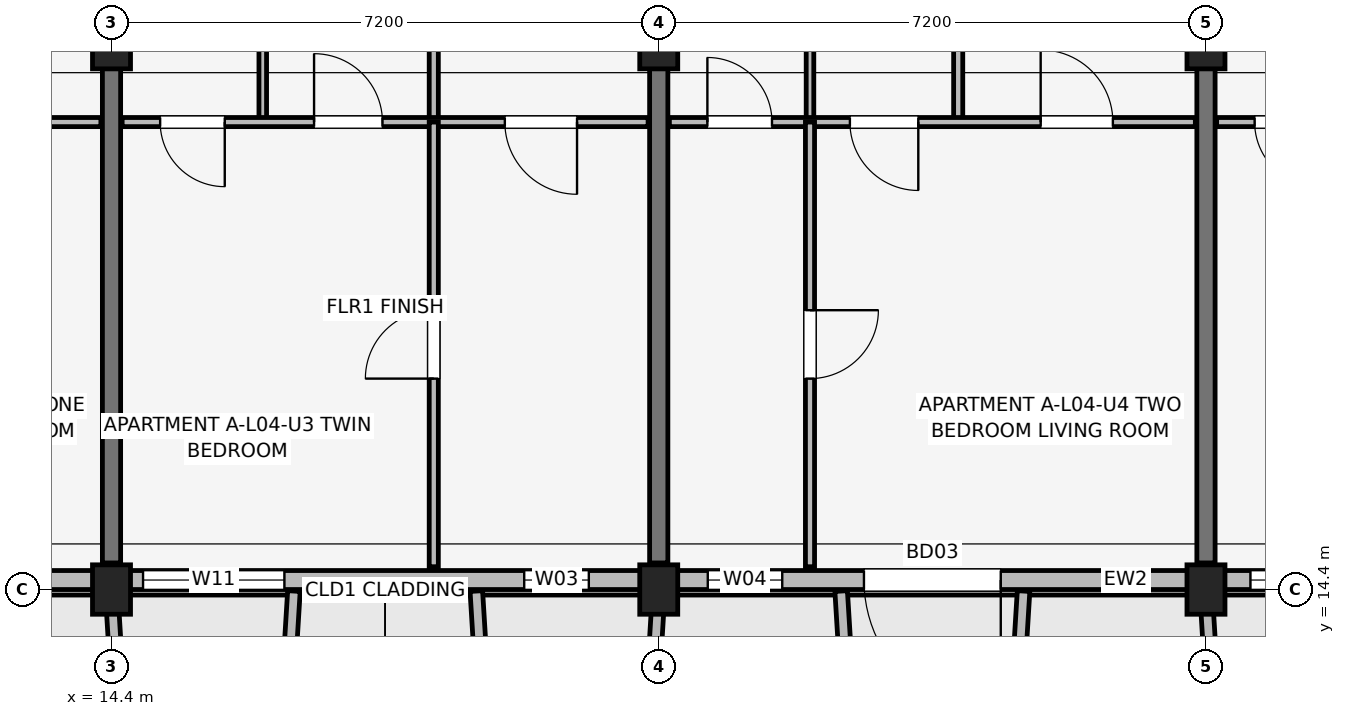
"""IFC4 building model, lengths in metres.
Left out: names, types, materials, properties, quantities, classifications, styles, units other than length and angle.
Written with IfcOpenShell. Run it as: python <this file> out.ifc"""

import sys

from ifc_helpers import new_model, si_unit, direction, frame, frame_2d, origin, origin_2d, place, context, subcontext, project, spatial, rectangle, extrude, element, fill, save


model = new_model("IFC4")
c1 = context("Model", 3, precision=1e-05, world=origin(), true_north=direction((0.0, 1.0)))
c2 = subcontext(c1, "Body", "Model", "MODEL_VIEW")
j1 = project(units=[si_unit("LENGTHUNIT", "METRE"), si_unit("PLANEANGLEUNIT", "RADIAN")], contexts=[c1])
p1 = place(None, origin())
s1 = spatial("IfcSite", under=j1, at=p1, CompositionType="ELEMENT")
p2 = place(p1, origin())
s2 = spatial("IfcBuilding", under=s1, at=p2, CompositionType="ELEMENT")
p3 = place(p2, frame((0.0, 0.0, 15.0)))
s3 = spatial("IfcBuildingStorey", under=s2, at=p3, CompositionType="ELEMENT", Elevation=15.0)
p4 = place(p3, frame((14.4, 14.4, 0.0), z_axis=(0.0, 0.0, 1.0), x_axis=(1.0, 0.0, 0.0)))
e1 = element("IfcColumn", 1, at=p4, inside=s3, PredefinedType="COLUMN", context=c2, shape_type="SweptSolid", body=[
    extrude(rectangle(XDim=0.5, YDim=0.65, at=origin_2d()), origin(), (0.0, 0.0, 1.0), 3.15),
])
p5 = place(p3, frame((14.4, 21.6, 0.0), z_axis=(0.0, 0.0, 1.0), x_axis=(1.0, 0.0, 0.0)))
e2 = element("IfcColumn", 2, at=p5, inside=s3, PredefinedType="COLUMN", context=c2, shape_type="SweptSolid", body=[
    extrude(rectangle(XDim=0.5, YDim=0.7, at=origin_2d()), origin(), (0.0, 0.0, 1.0), 3.15),
])
p6 = place(p3, frame((21.6, 14.4, 0.0), z_axis=(0.0, 0.0, 1.0), x_axis=(1.0, 0.0, 0.0)))
e3 = element("IfcColumn", 3, at=p6, inside=s3, PredefinedType="COLUMN", context=c2, shape_type="SweptSolid", body=[
    extrude(rectangle(XDim=0.5, YDim=0.65, at=origin_2d()), origin(), (0.0, 0.0, 1.0), 3.15),
])
p7 = place(p3, frame((21.6, 21.6, 0.0), z_axis=(0.0, 0.0, 1.0), x_axis=(1.0, 0.0, 0.0)))
e4 = element("IfcColumn", 4, at=p7, inside=s3, PredefinedType="COLUMN", context=c2, shape_type="SweptSolid", body=[
    extrude(rectangle(XDim=0.5, YDim=0.7, at=origin_2d()), origin(), (0.0, 0.0, 1.0), 3.15),
])
p8 = place(p3, frame((28.8, 14.4, 0.0), z_axis=(0.0, 0.0, 1.0), x_axis=(1.0, 0.0, 0.0)))
e5 = element("IfcColumn", 5, at=p8, inside=s3, PredefinedType="COLUMN", context=c2, shape_type="SweptSolid", body=[
    extrude(rectangle(XDim=0.5, YDim=0.65, at=origin_2d()), origin(), (0.0, 0.0, 1.0), 3.15),
])
p9 = place(p3, frame((28.8, 21.6, 0.0), z_axis=(0.0, 0.0, 1.0), x_axis=(1.0, 0.0, 0.0)))
e6 = element("IfcColumn", 6, at=p9, inside=s3, PredefinedType="COLUMN", context=c2, shape_type="SweptSolid", body=[
    extrude(rectangle(XDim=0.5, YDim=0.7, at=origin_2d()), origin(), (0.0, 0.0, 1.0), 3.15),
])
for number, where, z_axis, x_axis in (
    (7, (14.4, 14.75, 0.0), (0.0, 0.0, 1.0), (0.0, 1.0, 0.0)),
    (8, (21.6, 14.75, 0.0), (0.0, 0.0, 1.0), (0.0, 1.0, 0.0)),
    (9, (28.8, 14.75, 0.0), (0.0, 0.0, 1.0), (0.0, 1.0, 0.0)),
):
    element("IfcWall", number, at=place(p3, frame(where, z_axis=z_axis, x_axis=x_axis)), inside=s3, PredefinedType="SHEAR", context=c2, shape_type="SweptSolid", body=[
        extrude(rectangle(XDim=9.4, YDim=0.24, at=frame_2d((4.7, 0.0))), origin(), (0.0, 0.0, 1.0), 3.15),
    ])
p10 = place(p3, frame((3.4, 14.525, 0.0), z_axis=(0.0, 0.0, 1.0), x_axis=(1.0, 0.0, 0.0)))
e10 = element("IfcWall", 10, at=p10, inside=s3, PredefinedType="SOLIDWALL", context=c2, shape_type="SweptSolid", body=[
    extrude(rectangle(XDim=29.2, YDim=0.25, at=frame_2d((14.6, 0.0))), origin(), (0.0, 0.0, 1.0), 2.43),
])
p11 = place(p10, frame((8.15, 0.0, 0.0), z_axis=(0.0, 0.0, 1.0), x_axis=(-1.0, 0.0, 0.0)))
e11 = element("IfcOpeningElement", 11, at=p11, cuts=e10, PredefinedType="OPENING", context=c2, shape_type="SweptSolid", body=[
    extrude(rectangle(XDim=1.5, YDim=2.15, at=frame_2d((0.75, 1.075))), frame((0.0, 0.135, 0.0), z_axis=(0.0, -1.0, 0.0), x_axis=(1.0, 0.0, 0.0)), (0.0, 0.0, 1.0), 0.27),
])
p12 = place(p10, frame((22.7, 0.0, 0.0), z_axis=(0.0, 0.0, 1.0), x_axis=(-1.0, 0.0, 0.0)))
e12 = element("IfcOpeningElement", 12, at=p12, cuts=e10, PredefinedType="OPENING", context=c2, shape_type="SweptSolid", body=[
    extrude(rectangle(XDim=1.8, YDim=2.15, at=frame_2d((0.9, 1.075))), frame((0.0, 0.135, 0.0), z_axis=(0.0, -1.0, 0.0), x_axis=(1.0, 0.0, 0.0)), (0.0, 0.0, 1.0), 0.27),
])
p13 = place(p10, frame((2.155, 0.0, 0.75)))
e13 = element("IfcOpeningElement", 13, at=p13, cuts=e10, PredefinedType="OPENING", context=c2, shape_type="SweptSolid", body=[
    extrude(rectangle(XDim=1.22, YDim=1.5, at=frame_2d((0.61, 0.75))), frame((0.0, 0.135, 0.0), z_axis=(0.0, -1.0, 0.0), x_axis=(1.0, 0.0, 0.0)), (0.0, 0.0, 1.0), 0.27),
])
p14 = place(p10, frame((4.635, 0.0, 0.75)))
e14 = element("IfcOpeningElement", 14, at=p14, cuts=e10, PredefinedType="OPENING", context=c2, shape_type="SweptSolid", body=[
    extrude(rectangle(XDim=0.6, YDim=1.25, at=frame_2d((0.3, 0.625))), frame((0.0, 0.135, 0.0), z_axis=(0.0, -1.0, 0.0), x_axis=(1.0, 0.0, 0.0)), (0.0, 0.0, 1.0), 0.27),
])
p15 = place(p10, frame((11.415, 0.0, 0.7)))
e15 = element("IfcOpeningElement", 15, at=p15, cuts=e10, PredefinedType="OPENING", context=c2, shape_type="SweptSolid", body=[
    extrude(rectangle(XDim=1.86, YDim=1.6, at=frame_2d((0.93, 0.8))), frame((0.0, 0.135, 0.0), z_axis=(0.0, -1.0, 0.0), x_axis=(1.0, 0.0, 0.0)), (0.0, 0.0, 1.0), 0.27),
])
p16 = place(p10, frame((16.43, 0.0, 0.75)))
e16 = element("IfcOpeningElement", 16, at=p16, cuts=e10, PredefinedType="OPENING", context=c2, shape_type="SweptSolid", body=[
    extrude(rectangle(XDim=0.85, YDim=1.4, at=frame_2d((0.425, 0.7))), frame((0.0, 0.135, 0.0), z_axis=(0.0, -1.0, 0.0), x_axis=(1.0, 0.0, 0.0)), (0.0, 0.0, 1.0), 0.27),
])
p17 = place(p10, frame((18.845, 0.0, 0.75)))
e17 = element("IfcOpeningElement", 17, at=p17, cuts=e10, PredefinedType="OPENING", context=c2, shape_type="SweptSolid", body=[
    extrude(rectangle(XDim=0.98, YDim=1.45, at=frame_2d((0.49, 0.725))), frame((0.0, 0.135, 0.0), z_axis=(0.0, -1.0, 0.0), x_axis=(1.0, 0.0, 0.0)), (0.0, 0.0, 1.0), 0.27),
])
p18 = place(p10, frame((25.985, 0.0, 0.75)))
e18 = element("IfcOpeningElement", 18, at=p18, cuts=e10, PredefinedType="OPENING", context=c2, shape_type="SweptSolid", body=[
    extrude(rectangle(XDim=1.1, YDim=1.5, at=frame_2d((0.55, 0.75))), frame((0.0, 0.135, 0.0), z_axis=(0.0, -1.0, 0.0), x_axis=(1.0, 0.0, 0.0)), (0.0, 0.0, 1.0), 0.27),
])
p19 = place(p3, frame((14.4, 14.38, 0.0), z_axis=(0.0, 0.0, 1.0), x_axis=(0.061170732449, -0.998127317276, 0.0)))
e19 = element("IfcWall", 19, at=p19, inside=s3, PredefinedType="ELEMENTEDWALL", context=c2, shape_type="SweptSolid", body=[
    extrude(rectangle(XDim=1.964, YDim=0.165, at=frame_2d((0.982, 0.0))), origin(), (0.0, 0.0, 1.0), 2.95),
])
for number, where, z_axis, x_axis in (
    (20, (16.8, 14.38, 0.0), (0.0, 0.0, 1.0), (-0.061, -0.998, 0.0)),
    (21, (19.2, 14.38, 0.0), (0.0, 0.0, 1.0), (0.061, -0.998, 0.0)),
):
    element("IfcWall", number, at=place(p3, frame(where, z_axis=z_axis, x_axis=x_axis)), inside=s3, PredefinedType="ELEMENTEDWALL", context=c2, shape_type="SweptSolid", body=[
        extrude(rectangle(XDim=1.964, YDim=0.165, at=frame_2d((0.982, 0.0))), origin(), (0.0, 0.0, 1.0), 2.53),
    ])
p20 = place(p3, frame((21.6, 14.38, 0.0), z_axis=(0.0, 0.0, 1.0), x_axis=(-0.061170732449, -0.998127317276, 0.0)))
e22 = element("IfcWall", 22, at=p20, inside=s3, PredefinedType="ELEMENTEDWALL", context=c2, shape_type="SweptSolid", body=[
    extrude(rectangle(XDim=1.964, YDim=0.165, at=frame_2d((0.982, 0.0))), origin(), (0.0, 0.0, 1.0), 2.95),
])
for number, where, z_axis, x_axis in (
    (23, (24.0, 14.38, 0.0), (0.0, 0.0, 1.0), (0.061, -0.998, 0.0)),
    (24, (26.4, 14.38, 0.0), (0.0, 0.0, 1.0), (-0.061, -0.998, 0.0)),
):
    element("IfcWall", number, at=place(p3, frame(where, z_axis=z_axis, x_axis=x_axis)), inside=s3, PredefinedType="ELEMENTEDWALL", context=c2, shape_type="SweptSolid", body=[
        extrude(rectangle(XDim=1.964, YDim=0.165, at=frame_2d((0.982, 0.0))), origin(), (0.0, 0.0, 1.0), 2.48),
    ])
p21 = place(p3, frame((28.8, 14.38, 0.0), z_axis=(0.0, 0.0, 1.0), x_axis=(0.061046865508, -0.998134900808, 0.0)))
e25 = element("IfcWall", 25, at=p21, inside=s3, PredefinedType="ELEMENTEDWALL", context=c2, shape_type="SweptSolid", body=[
    extrude(rectangle(XDim=1.964, YDim=0.165, at=frame_2d((0.982, 0.0))), origin(), (0.0, 0.0, 1.0), 2.95),
])
p22 = place(p3, frame((7.34, 20.55, 0.0), z_axis=(0.0, 0.0, 1.0), x_axis=(1.0, 0.0, 0.0)))
e26 = element("IfcWall", 26, at=p22, inside=s3, PredefinedType="PARTITIONING", context=c2, shape_type="SweptSolid", body=[
    extrude(rectangle(XDim=6.92, YDim=0.12, at=frame_2d((3.46, 0.0))), origin(), (0.0, 0.0, 1.0), 2.38),
])
p23 = place(p22, frame((0.5, 0.0, 0.0)))
e27 = element("IfcOpeningElement", 27, at=p23, cuts=e26, PredefinedType="OPENING", context=c2, shape_type="SweptSolid", body=[
    extrude(rectangle(XDim=0.85, YDim=2.08, at=frame_2d((0.425, 1.04))), frame((0.0, 0.07, 0.0), z_axis=(0.0, -1.0, 0.0), x_axis=(1.0, 0.0, 0.0)), (0.0, 0.0, 1.0), 0.14),
])
p24 = place(p22, frame((3.275, 0.0, 0.0), z_axis=(0.0, 0.0, 1.0), x_axis=(-1.0, 0.0, 0.0)))
e28 = element("IfcOpeningElement", 28, at=p24, cuts=e26, PredefinedType="OPENING", context=c2, shape_type="SweptSolid", body=[
    extrude(rectangle(XDim=0.9, YDim=2.08, at=frame_2d((0.45, 1.04))), frame((0.0, 0.07, 0.0), z_axis=(0.0, -1.0, 0.0), x_axis=(1.0, 0.0, 0.0)), (0.0, 0.0, 1.0), 0.14),
])
p25 = place(p22, frame((4.885, 0.0, 0.0)))
e29 = element("IfcOpeningElement", 29, at=p25, cuts=e26, PredefinedType="OPENING", context=c2, shape_type="SweptSolid", body=[
    extrude(rectangle(XDim=0.95, YDim=2.08, at=frame_2d((0.475, 1.04))), frame((0.0, 0.07, 0.0), z_axis=(0.0, -1.0, 0.0), x_axis=(1.0, 0.0, 0.0)), (0.0, 0.0, 1.0), 0.14),
])
p26 = place(p3, frame((16.39, 20.55, 0.0), z_axis=(0.0, 0.0, 1.0), x_axis=(0.0, 1.0, 0.0)))
e30 = element("IfcWall", 30, at=p26, inside=s3, PredefinedType="PARTITIONING", context=c2, shape_type="SweptSolid", body=[
    extrude(rectangle(XDim=3.75, YDim=0.1, at=frame_2d((1.875, 0.0))), origin(), (0.0, 0.0, 1.0), 2.375),
])
p27 = place(p3, frame((18.64, 20.55, 0.0), z_axis=(0.0, 0.0, 1.0), x_axis=(0.0, 1.0, 0.0)))
e31 = element("IfcWall", 31, at=p27, inside=s3, PredefinedType="PARTITIONING", context=c2, shape_type="SweptSolid", body=[
    extrude(rectangle(XDim=3.75, YDim=0.12, at=frame_2d((1.875, 0.0))), origin(), (0.0, 0.0, 1.0), 2.375),
])
p28 = place(p3, frame((14.54, 20.55, 0.0), z_axis=(0.0, 0.0, 1.0), x_axis=(1.0, 0.0, 0.0)))
e32 = element("IfcWall", 32, at=p28, inside=s3, PredefinedType="PARTITIONING", context=c2, shape_type="SweptSolid", body=[
    extrude(rectangle(XDim=6.92, YDim=0.12, at=frame_2d((3.46, 0.0))), origin(), (0.0, 0.0, 1.0), 2.38),
])
p29 = place(p28, frame((1.35, 0.0, 0.0), z_axis=(0.0, 0.0, 1.0), x_axis=(-1.0, 0.0, 0.0)))
e33 = element("IfcOpeningElement", 33, at=p29, cuts=e32, PredefinedType="OPENING", context=c2, shape_type="SweptSolid", body=[
    extrude(rectangle(XDim=0.85, YDim=2.08, at=frame_2d((0.425, 1.04))), frame((0.0, 0.07, 0.0), z_axis=(0.0, -1.0, 0.0), x_axis=(1.0, 0.0, 0.0)), (0.0, 0.0, 1.0), 0.14),
])
p30 = place(p28, frame((2.525, 0.0, 0.0)))
e34 = element("IfcOpeningElement", 34, at=p30, cuts=e32, PredefinedType="OPENING", context=c2, shape_type="SweptSolid", body=[
    extrude(rectangle(XDim=0.9, YDim=2.08, at=frame_2d((0.45, 1.04))), frame((0.0, 0.07, 0.0), z_axis=(0.0, -1.0, 0.0), x_axis=(1.0, 0.0, 0.0)), (0.0, 0.0, 1.0), 0.14),
])
p31 = place(p28, frame((5.985, 0.0, 0.0), z_axis=(0.0, 0.0, 1.0), x_axis=(-1.0, 0.0, 0.0)))
e35 = element("IfcOpeningElement", 35, at=p31, cuts=e32, PredefinedType="OPENING", context=c2, shape_type="SweptSolid", body=[
    extrude(rectangle(XDim=0.95, YDim=2.08, at=frame_2d((0.475, 1.04))), frame((0.0, 0.07, 0.0), z_axis=(0.0, -1.0, 0.0), x_axis=(1.0, 0.0, 0.0)), (0.0, 0.0, 1.0), 0.14),
])
p32 = place(p3, frame((18.64, 14.7, 0.0), z_axis=(0.0, 0.0, 1.0), x_axis=(0.0, 1.0, 0.0)))
e36 = element("IfcWall", 36, at=p32, inside=s3, PredefinedType="PARTITIONING", context=c2, shape_type="SweptSolid", body=[
    extrude(rectangle(XDim=5.85, YDim=0.12, at=frame_2d((2.925, 0.0))), origin(), (0.0, 0.0, 1.0), 2.38),
])
p33 = place(p32, frame((2.475, 0.0, 0.0)))
e37 = element("IfcOpeningElement", 37, at=p33, cuts=e36, PredefinedType="OPENING", context=c2, shape_type="SweptSolid", body=[
    extrude(rectangle(XDim=0.9, YDim=2.08, at=frame_2d((0.45, 1.04))), frame((0.0, 0.07, 0.0), z_axis=(0.0, -1.0, 0.0), x_axis=(1.0, 0.0, 0.0)), (0.0, 0.0, 1.0), 0.14),
])
p34 = place(p3, frame((23.59, 20.55, 0.0), z_axis=(0.0, 0.0, 1.0), x_axis=(0.0, 1.0, 0.0)))
e38 = element("IfcWall", 38, at=p34, inside=s3, PredefinedType="PARTITIONING", context=c2, shape_type="SweptSolid", body=[
    extrude(rectangle(XDim=3.75, YDim=0.1, at=frame_2d((1.875, 0.0))), origin(), (0.0, 0.0, 1.0), 2.375),
])
p35 = place(p3, frame((25.54, 20.55, 0.0), z_axis=(0.0, 0.0, 1.0), x_axis=(0.0, 1.0, 0.0)))
e39 = element("IfcWall", 39, at=p35, inside=s3, PredefinedType="PARTITIONING", context=c2, shape_type="SweptSolid", body=[
    extrude(rectangle(XDim=3.75, YDim=0.12, at=frame_2d((1.875, 0.0))), origin(), (0.0, 0.0, 1.0), 2.375),
])
p36 = place(p3, frame((21.74, 20.55, 0.0), z_axis=(0.0, 0.0, 1.0), x_axis=(1.0, 0.0, 0.0)))
e40 = element("IfcWall", 40, at=p36, inside=s3, PredefinedType="PARTITIONING", context=c2, shape_type="SweptSolid", body=[
    extrude(rectangle(XDim=6.92, YDim=0.12, at=frame_2d((3.46, 0.0))), origin(), (0.0, 0.0, 1.0), 2.38),
])
p37 = place(p36, frame((0.5, 0.0, 0.0)))
e41 = element("IfcOpeningElement", 41, at=p37, cuts=e40, PredefinedType="OPENING", context=c2, shape_type="SweptSolid", body=[
    extrude(rectangle(XDim=0.85, YDim=2.08, at=frame_2d((0.425, 1.04))), frame((0.0, 0.07, 0.0), z_axis=(0.0, -1.0, 0.0), x_axis=(1.0, 0.0, 0.0)), (0.0, 0.0, 1.0), 0.14),
])
p38 = place(p36, frame((3.275, 0.0, 0.0), z_axis=(0.0, 0.0, 1.0), x_axis=(-1.0, 0.0, 0.0)))
e42 = element("IfcOpeningElement", 42, at=p38, cuts=e40, PredefinedType="OPENING", context=c2, shape_type="SweptSolid", body=[
    extrude(rectangle(XDim=0.9, YDim=2.08, at=frame_2d((0.45, 1.04))), frame((0.0, 0.07, 0.0), z_axis=(0.0, -1.0, 0.0), x_axis=(1.0, 0.0, 0.0)), (0.0, 0.0, 1.0), 0.14),
])
p39 = place(p36, frame((4.885, 0.0, 0.0)))
e43 = element("IfcOpeningElement", 43, at=p39, cuts=e40, PredefinedType="OPENING", context=c2, shape_type="SweptSolid", body=[
    extrude(rectangle(XDim=0.95, YDim=2.08, at=frame_2d((0.475, 1.04))), frame((0.0, 0.07, 0.0), z_axis=(0.0, -1.0, 0.0), x_axis=(1.0, 0.0, 0.0)), (0.0, 0.0, 1.0), 0.14),
])
p40 = place(p3, frame((23.59, 14.7, 0.0), z_axis=(0.0, 0.0, 1.0), x_axis=(0.0, 1.0, 0.0)))
e44 = element("IfcWall", 44, at=p40, inside=s3, PredefinedType="PARTITIONING", context=c2, shape_type="SweptSolid", body=[
    extrude(rectangle(XDim=5.85, YDim=0.12, at=frame_2d((2.925, 0.0))), origin(), (0.0, 0.0, 1.0), 2.38),
])
p41 = place(p40, frame((3.375, 0.0, 0.0), z_axis=(0.0, 0.0, 1.0), x_axis=(-1.0, 0.0, 0.0)))
e45 = element("IfcOpeningElement", 45, at=p41, cuts=e44, PredefinedType="OPENING", context=c2, shape_type="SweptSolid", body=[
    extrude(rectangle(XDim=0.9, YDim=2.08, at=frame_2d((0.45, 1.04))), frame((0.0, 0.07, 0.0), z_axis=(0.0, -1.0, 0.0), x_axis=(1.0, 0.0, 0.0)), (0.0, 0.0, 1.0), 0.14),
])
p42 = place(p3, frame((28.94, 20.55, 0.0), z_axis=(0.0, 0.0, 1.0), x_axis=(1.0, 0.0, 0.0)))
e46 = element("IfcWall", 46, at=p42, inside=s3, PredefinedType="PARTITIONING", context=c2, shape_type="SweptSolid", body=[
    extrude(rectangle(XDim=6.92, YDim=0.12, at=frame_2d((3.46, 0.0))), origin(), (0.0, 0.0, 1.0), 2.38),
])
p43 = place(p42, frame((1.35, 0.0, 0.0), z_axis=(0.0, 0.0, 1.0), x_axis=(-1.0, 0.0, 0.0)))
e47 = element("IfcOpeningElement", 47, at=p43, cuts=e46, PredefinedType="OPENING", context=c2, shape_type="SweptSolid", body=[
    extrude(rectangle(XDim=0.85, YDim=2.08, at=frame_2d((0.425, 1.04))), frame((0.0, 0.07, 0.0), z_axis=(0.0, -1.0, 0.0), x_axis=(1.0, 0.0, 0.0)), (0.0, 0.0, 1.0), 0.14),
])
p44 = place(p42, frame((2.255, 0.0, 0.0)))
e48 = element("IfcOpeningElement", 48, at=p44, cuts=e46, PredefinedType="OPENING", context=c2, shape_type="SweptSolid", body=[
    extrude(rectangle(XDim=0.9, YDim=2.08, at=frame_2d((0.45, 1.04))), frame((0.0, 0.07, 0.0), z_axis=(0.0, -1.0, 0.0), x_axis=(1.0, 0.0, 0.0)), (0.0, 0.0, 1.0), 0.14),
])
p45 = place(p42, frame((4.86, 0.0, 0.0), z_axis=(0.0, 0.0, 1.0), x_axis=(-1.0, 0.0, 0.0)))
e49 = element("IfcOpeningElement", 49, at=p45, cuts=e46, PredefinedType="OPENING", context=c2, shape_type="SweptSolid", body=[
    extrude(rectangle(XDim=0.95, YDim=2.08, at=frame_2d((0.475, 1.04))), frame((0.0, 0.07, 0.0), z_axis=(0.0, -1.0, 0.0), x_axis=(1.0, 0.0, 0.0)), (0.0, 0.0, 1.0), 0.14),
])
p46 = place(p12, origin())
e50 = element("IfcDoor", 50, at=p46, inside=s3, OperationType="SINGLE_SWING_RIGHT", PredefinedType="DOOR", context=c2, shape_type="SweptSolid", body=[
    extrude(rectangle(XDim=1.8, YDim=2.15, at=frame_2d((0.9, 1.075))), frame((0.0, 0.025, 0.0), z_axis=(0.0, -1.0, 0.0), x_axis=(1.0, 0.0, 0.0)), (0.0, 0.0, 1.0), 0.05),
])
fill(e12, e50)
p47 = place(p15, origin())
e51 = element("IfcWindow", 51, at=p47, inside=s3, PartitioningType="SINGLE_PANEL", PredefinedType="WINDOW", context=c2, shape_type="SweptSolid", body=[
    extrude(rectangle(XDim=1.86, YDim=1.6, at=frame_2d((0.93, 0.8))), frame((0.0, 0.03, 0.0), z_axis=(0.0, -1.0, 0.0), x_axis=(1.0, 0.0, 0.0)), (0.0, 0.0, 1.0), 0.06),
])
fill(e15, e51)
p48 = place(p16, origin())
e52 = element("IfcWindow", 52, at=p48, inside=s3, PartitioningType="SINGLE_PANEL", PredefinedType="WINDOW", context=c2, shape_type="SweptSolid", body=[
    extrude(rectangle(XDim=0.85, YDim=1.4, at=frame_2d((0.425, 0.7))), frame((0.0, 0.03, 0.0), z_axis=(0.0, -1.0, 0.0), x_axis=(1.0, 0.0, 0.0)), (0.0, 0.0, 1.0), 0.06),
])
fill(e16, e52)
p49 = place(p17, origin())
e53 = element("IfcWindow", 53, at=p49, inside=s3, PartitioningType="SINGLE_PANEL", PredefinedType="WINDOW", context=c2, shape_type="SweptSolid", body=[
    extrude(rectangle(XDim=0.98, YDim=1.45, at=frame_2d((0.49, 0.725))), frame((0.0, 0.03, 0.0), z_axis=(0.0, -1.0, 0.0), x_axis=(1.0, 0.0, 0.0)), (0.0, 0.0, 1.0), 0.06),
])
fill(e17, e53)
p50 = place(p18, origin())
e54 = element("IfcWindow", 54, at=p50, inside=s3, PartitioningType="SINGLE_PANEL", PredefinedType="WINDOW", context=c2, shape_type="SweptSolid", body=[
    extrude(rectangle(XDim=1.1, YDim=1.5, at=frame_2d((0.55, 0.75))), frame((0.0, 0.03, 0.0), z_axis=(0.0, -1.0, 0.0), x_axis=(1.0, 0.0, 0.0)), (0.0, 0.0, 1.0), 0.06),
])
fill(e18, e54)
p51 = place(p29, origin())
e55 = element("IfcDoor", 55, at=p51, inside=s3, OperationType="SINGLE_SWING_RIGHT", PredefinedType="DOOR", context=c2, shape_type="SweptSolid", body=[
    extrude(rectangle(XDim=0.85, YDim=2.08, at=frame_2d((0.425, 1.04))), frame((0.0, 0.025, 0.0), z_axis=(0.0, -1.0, 0.0), x_axis=(1.0, 0.0, 0.0)), (0.0, 0.0, 1.0), 0.05),
])
fill(e33, e55)
p52 = place(p30, origin())
e56 = element("IfcDoor", 56, at=p52, inside=s3, OperationType="SINGLE_SWING_LEFT", PredefinedType="DOOR", context=c2, shape_type="SweptSolid", body=[
    extrude(rectangle(XDim=0.9, YDim=2.08, at=frame_2d((0.45, 1.04))), frame((0.0, 0.025, 0.0), z_axis=(0.0, -1.0, 0.0), x_axis=(1.0, 0.0, 0.0)), (0.0, 0.0, 1.0), 0.05),
])
fill(e34, e56)
p53 = place(p31, origin())
e57 = element("IfcDoor", 57, at=p53, inside=s3, OperationType="SINGLE_SWING_RIGHT", PredefinedType="DOOR", context=c2, shape_type="SweptSolid", body=[
    extrude(rectangle(XDim=0.95, YDim=2.08, at=frame_2d((0.475, 1.04))), frame((0.0, 0.025, 0.0), z_axis=(0.0, -1.0, 0.0), x_axis=(1.0, 0.0, 0.0)), (0.0, 0.0, 1.0), 0.05),
])
fill(e35, e57)
p54 = place(p33, origin())
e58 = element("IfcDoor", 58, at=p54, inside=s3, OperationType="SINGLE_SWING_LEFT", PredefinedType="DOOR", context=c2, shape_type="SweptSolid", body=[
    extrude(rectangle(XDim=0.9, YDim=2.08, at=frame_2d((0.45, 1.04))), frame((0.0, 0.025, 0.0), z_axis=(0.0, -1.0, 0.0), x_axis=(1.0, 0.0, 0.0)), (0.0, 0.0, 1.0), 0.05),
])
fill(e37, e58)
p55 = place(p37, origin())
e59 = element("IfcDoor", 59, at=p55, inside=s3, OperationType="SINGLE_SWING_LEFT", PredefinedType="DOOR", context=c2, shape_type="SweptSolid", body=[
    extrude(rectangle(XDim=0.85, YDim=2.08, at=frame_2d((0.425, 1.04))), frame((0.0, 0.025, 0.0), z_axis=(0.0, -1.0, 0.0), x_axis=(1.0, 0.0, 0.0)), (0.0, 0.0, 1.0), 0.05),
])
fill(e41, e59)
p56 = place(p38, origin())
e60 = element("IfcDoor", 60, at=p56, inside=s3, OperationType="SINGLE_SWING_RIGHT", PredefinedType="DOOR", context=c2, shape_type="SweptSolid", body=[
    extrude(rectangle(XDim=0.9, YDim=2.08, at=frame_2d((0.45, 1.04))), frame((0.0, 0.025, 0.0), z_axis=(0.0, -1.0, 0.0), x_axis=(1.0, 0.0, 0.0)), (0.0, 0.0, 1.0), 0.05),
])
fill(e42, e60)
p57 = place(p39, origin())
e61 = element("IfcDoor", 61, at=p57, inside=s3, OperationType="SINGLE_SWING_LEFT", PredefinedType="DOOR", context=c2, shape_type="SweptSolid", body=[
    extrude(rectangle(XDim=0.95, YDim=2.08, at=frame_2d((0.475, 1.04))), frame((0.0, 0.025, 0.0), z_axis=(0.0, -1.0, 0.0), x_axis=(1.0, 0.0, 0.0)), (0.0, 0.0, 1.0), 0.05),
])
fill(e43, e61)
p58 = place(p41, origin())
e62 = element("IfcDoor", 62, at=p58, inside=s3, OperationType="SINGLE_SWING_RIGHT", PredefinedType="DOOR", context=c2, shape_type="SweptSolid", body=[
    extrude(rectangle(XDim=0.9, YDim=2.08, at=frame_2d((0.45, 1.04))), frame((0.0, 0.025, 0.0), z_axis=(0.0, -1.0, 0.0), x_axis=(1.0, 0.0, 0.0)), (0.0, 0.0, 1.0), 0.05),
])
fill(e45, e62)
p59 = place(p43, origin())
e63 = element("IfcDoor", 63, at=p59, inside=s3, OperationType="SINGLE_SWING_RIGHT", PredefinedType="DOOR", context=c2, shape_type="SweptSolid", body=[
    extrude(rectangle(XDim=0.85, YDim=2.08, at=frame_2d((0.425, 1.04))), frame((0.0, 0.025, 0.0), z_axis=(0.0, -1.0, 0.0), x_axis=(1.0, 0.0, 0.0)), (0.0, 0.0, 1.0), 0.05),
])
fill(e47, e63)
save(model, sys.argv[1])
